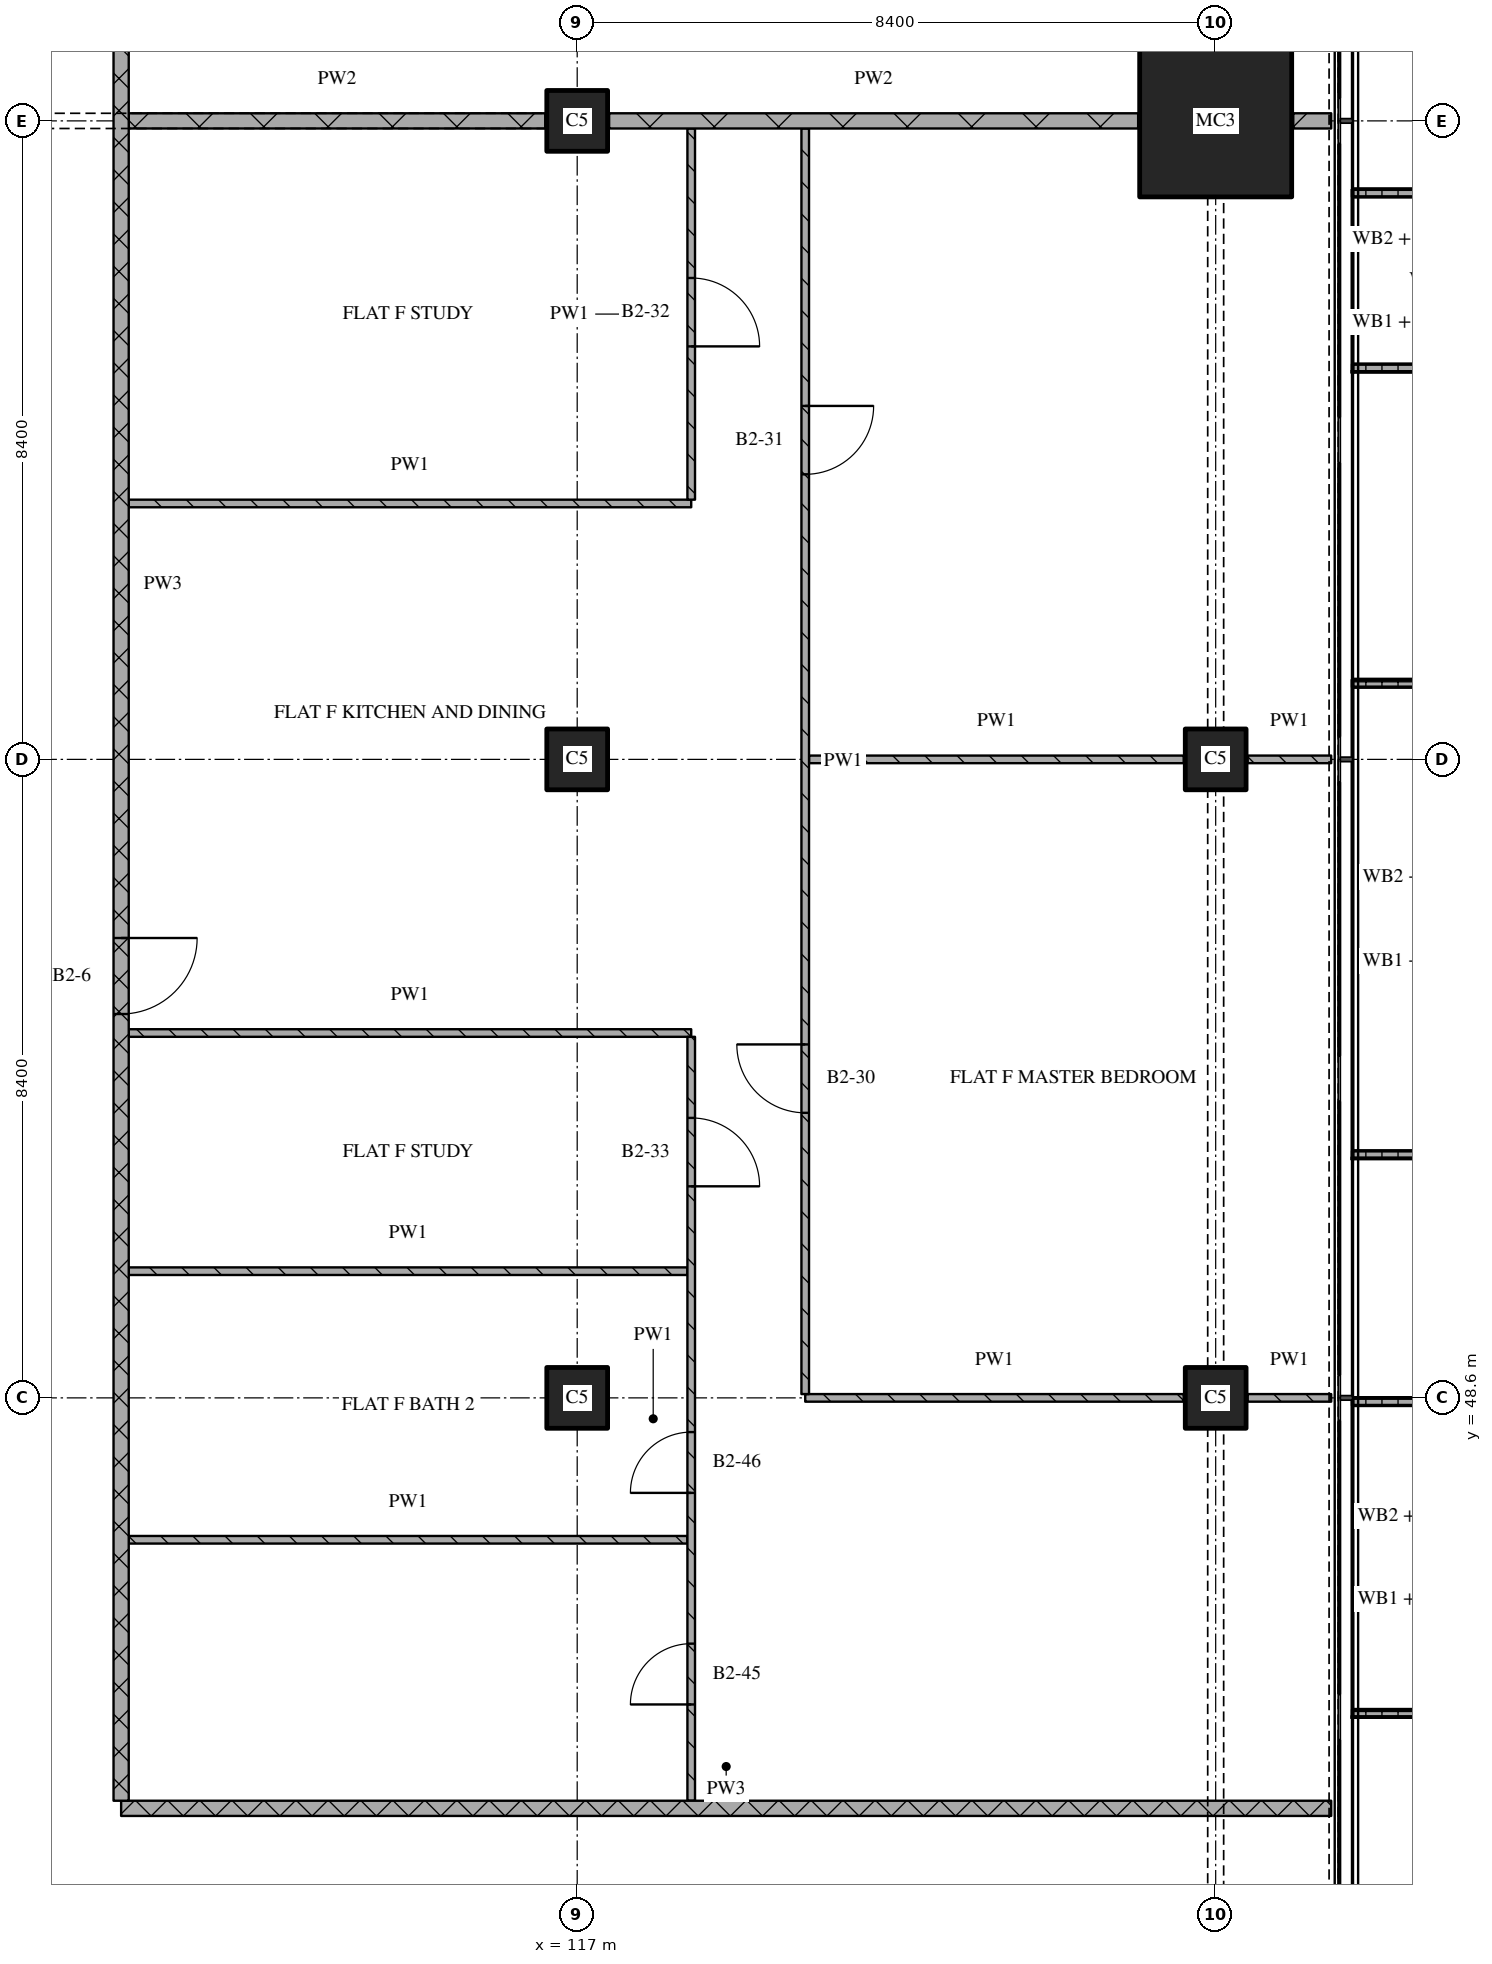
"""IFC4 building model, lengths in metres.
Left out: names, types, materials, properties, quantities, classifications, styles, units other than length and angle.
Written with IfcOpenShell. Run it as: python <this file> out.ifc"""

import sys

from ifc_helpers import new_model, si_unit, direction, frame, frame_2d, origin, origin_2d, place, context, subcontext, project, spatial, polyline, rectangle, outline, extrude, element, fill, save


model = new_model("IFC4")
c1 = context("Model", 3, precision=1e-05, world=origin(), true_north=direction((0.0, 1.0)))
c2 = subcontext(c1, "Body", "Model", "MODEL_VIEW")
j1 = project(units=[si_unit("LENGTHUNIT", "METRE"), si_unit("PLANEANGLEUNIT", "RADIAN")], contexts=[c1])
p1 = place(None, origin())
s1 = spatial("IfcSite", under=j1, at=p1, CompositionType="ELEMENT")
p2 = place(p1, origin())
s2 = spatial("IfcBuilding", under=s1, at=p2, CompositionType="ELEMENT")
p3 = place(p2, frame((0.0, 0.0, 106.05)))
s3 = spatial("IfcBuildingStorey", under=s2, at=p3, CompositionType="ELEMENT", Elevation=106.05)
for number, where, z_axis, x_axis in (
    (1, (117.0, 48.6, 0.0), (0.0, 0.0, 1.0), (1.0, 0.0, 0.0)),
    (2, (117.0, 57.0, 0.0), (0.0, 0.0, 1.0), (1.0, 0.0, 0.0)),
    (3, (117.0, 65.4, 0.0), (0.0, 0.0, 1.0), (1.0, 0.0, 0.0)),
    (4, (125.4, 48.6, 0.0), (0.0, 0.0, 1.0), (1.0, 0.0, 0.0)),
    (5, (125.4, 57.0, 0.0), (0.0, 0.0, 1.0), (1.0, 0.0, 0.0)),
):
    element("IfcColumn", number, at=place(p3, frame(where, z_axis=z_axis, x_axis=x_axis)), inside=s3, PredefinedType="COLUMN", context=c2, shape_type="SweptSolid", body=[
        extrude(rectangle(XDim=0.8, YDim=0.8, at=origin_2d()), origin(), (0.0, 0.0, 1.0), 3.6),
    ])
p4 = place(p3, frame((125.4, 65.4, 0.0), z_axis=(0.0, 0.0, 1.0), x_axis=(1.0, 0.0, 0.0)))
e6 = element("IfcColumn", 6, at=p4, inside=s3, PredefinedType="COLUMN", context=c2, shape_type="SweptSolid", body=[
    extrude(rectangle(XDim=2.0, YDim=2.0, at=origin_2d()), origin(), (0.0, 0.0, 1.0), 3.6),
])
p5 = place(p3, origin())
e7 = element("IfcWall", 7, at=p5, inside=s3, PredefinedType="SOLIDWALL", context=c2, shape_type="SweptSolid", body=[
    extrude(outline(polyline([(127.2, 44.4), (127.2, 44.5), (128.833, 44.5), (128.833, 48.5), (127.2, 48.5), (127.2, 48.6), (128.933, 48.6), (128.933, 44.4), (127.2, 44.4)])), origin(), (0.0, 0.0, 1.0), 1.0),
])
p6 = place(p3, origin())
e8 = element("IfcWall", 8, at=p6, inside=s3, PredefinedType="SOLIDWALL", context=c2, shape_type="SweptSolid", body=[
    extrude(outline(polyline([(127.2, 51.75), (127.2, 51.85), (128.967, 51.85), (128.967, 57.95), (127.2, 57.95), (127.2, 58.05), (129.067, 58.05), (129.067, 51.75), (127.2, 51.75)])), origin(), (0.0, 0.0, 1.0), 1.0),
])
p7 = place(p3, origin())
e9 = element("IfcWall", 9, at=p7, inside=s3, PredefinedType="SOLIDWALL", context=c2, shape_type="SweptSolid", body=[
    extrude(outline(polyline([(127.2, 62.1), (127.2, 62.2), (128.7, 62.2), (128.7, 64.4), (127.2, 64.4), (127.2, 64.5), (128.8, 64.5), (128.8, 62.1), (127.2, 62.1)])), origin(), (0.0, 0.0, 1.0), 1.0),
])
p8 = place(p3, frame((111.0, 43.2, 0.0), z_axis=(0.0, 0.0, 1.0), x_axis=(1.0, 0.0, 0.0)))
e10 = element("IfcWall", 10, at=p8, inside=s3, PredefinedType="PARTITIONING", context=c2, shape_type="SweptSolid", body=[
    extrude(rectangle(XDim=15.92, YDim=0.2, at=frame_2d((7.96, 0.0))), origin(), (0.0, 0.0, 1.0), 3.32),
])
p9 = place(p3, frame((111.1, 46.733, 0.0), z_axis=(0.0, 0.0, 1.0), x_axis=(1.0, 0.0, 0.0)))
e11 = element("IfcWall", 11, at=p9, inside=s3, PredefinedType="PARTITIONING", context=c2, shape_type="SweptSolid", body=[
    extrude(rectangle(XDim=7.35, YDim=0.1, at=frame_2d((3.675, 0.0))), origin(), (0.0, 0.0, 1.0), 3.32),
])
p10 = place(p3, frame((120.0, 48.6, 0.0), z_axis=(0.0, 0.0, 1.0), x_axis=(1.0, 0.0, 0.0)))
e12 = element("IfcWall", 12, at=p10, inside=s3, PredefinedType="PARTITIONING", context=c2, shape_type="SweptSolid", body=[
    extrude(rectangle(XDim=4.98, YDim=0.1, at=frame_2d((2.49, 0.0))), origin(), (0.0, 0.0, 1.0), 3.32),
])
p11 = place(p3, frame((125.82, 48.6, 0.0), z_axis=(0.0, 0.0, 1.0), x_axis=(1.0, 0.0, 0.0)))
e13 = element("IfcWall", 13, at=p11, inside=s3, PredefinedType="PARTITIONING", context=c2, shape_type="SweptSolid", body=[
    extrude(rectangle(XDim=1.1, YDim=0.1, at=frame_2d((0.55, 0.0))), origin(), (0.0, 0.0, 1.0), 3.32),
])
p12 = place(p3, frame((111.1, 50.267, 0.0), z_axis=(0.0, 0.0, 1.0), x_axis=(1.0, 0.0, 0.0)))
e14 = element("IfcWall", 14, at=p12, inside=s3, PredefinedType="PARTITIONING", context=c2, shape_type="SweptSolid", body=[
    extrude(rectangle(XDim=7.35, YDim=0.1, at=frame_2d((3.675, 0.0))), origin(), (0.0, 0.0, 1.0), 3.32),
])
p13 = place(p3, frame((111.1, 53.4, 0.0), z_axis=(0.0, 0.0, 1.0), x_axis=(1.0, 0.0, 0.0)))
e15 = element("IfcWall", 15, at=p13, inside=s3, PredefinedType="PARTITIONING", context=c2, shape_type="SweptSolid", body=[
    extrude(rectangle(XDim=7.4, YDim=0.1, at=frame_2d((3.7, 0.0))), origin(), (0.0, 0.0, 1.0), 3.32),
])
p14 = place(p3, frame((120.05, 57.0, 0.0), z_axis=(0.0, 0.0, 1.0), x_axis=(1.0, 0.0, 0.0)))
e16 = element("IfcWall", 16, at=p14, inside=s3, PredefinedType="PARTITIONING", context=c2, shape_type="SweptSolid", body=[
    extrude(rectangle(XDim=4.93, YDim=0.1, at=frame_2d((2.465, 0.0))), origin(), (0.0, 0.0, 1.0), 3.32),
])
p15 = place(p3, frame((125.82, 57.0, 0.0), z_axis=(0.0, 0.0, 1.0), x_axis=(1.0, 0.0, 0.0)))
e17 = element("IfcWall", 17, at=p15, inside=s3, PredefinedType="PARTITIONING", context=c2, shape_type="SweptSolid", body=[
    extrude(rectangle(XDim=1.1, YDim=0.1, at=frame_2d((0.55, 0.0))), origin(), (0.0, 0.0, 1.0), 3.32),
])
p16 = place(p3, frame((111.1, 60.367, 0.0), z_axis=(0.0, 0.0, 1.0), x_axis=(1.0, 0.0, 0.0)))
e18 = element("IfcWall", 18, at=p16, inside=s3, PredefinedType="PARTITIONING", context=c2, shape_type="SweptSolid", body=[
    extrude(rectangle(XDim=7.4, YDim=0.1, at=frame_2d((3.7, 0.0))), origin(), (0.0, 0.0, 1.0), 3.32),
])
p17 = place(p3, frame((111.1, 65.4, 0.0), z_axis=(0.0, 0.0, 1.0), x_axis=(1.0, 0.0, 0.0)))
e19 = element("IfcWall", 19, at=p17, inside=s3, PredefinedType="PARTITIONING", context=c2, shape_type="SweptSolid", body=[
    extrude(rectangle(XDim=5.48, YDim=0.2, at=frame_2d((2.74, 0.0))), origin(), (0.0, 0.0, 1.0), 2.82),
])
p18 = place(p3, frame((117.42, 65.4, 0.0), z_axis=(0.0, 0.0, 1.0), x_axis=(1.0, 0.0, 0.0)))
e20 = element("IfcWall", 20, at=p18, inside=s3, PredefinedType="PARTITIONING", context=c2, shape_type="SweptSolid", body=[
    extrude(rectangle(XDim=6.96, YDim=0.2, at=frame_2d((3.48, 0.0))), origin(), (0.0, 0.0, 1.0), 3.32),
])
p19 = place(p3, frame((126.42, 65.4, 0.0), z_axis=(0.0, 0.0, 1.0), x_axis=(1.0, 0.0, 0.0)))
e21 = element("IfcWall", 21, at=p19, inside=s3, PredefinedType="PARTITIONING", context=c2, shape_type="SweptSolid", body=[
    extrude(rectangle(XDim=0.5, YDim=0.2, at=frame_2d((0.25, 0.0))), origin(), (0.0, 0.0, 1.0), 3.32),
])
p20 = place(p3, frame((111.0, 75.32, 0.0), z_axis=(0.0, 0.0, 1.0), x_axis=(0.0, -1.0, 0.0)))
e22 = element("IfcWall", 22, at=p20, inside=s3, PredefinedType="PARTITIONING", context=c2, shape_type="SweptSolid", body=[
    extrude(rectangle(XDim=32.02, YDim=0.2, at=frame_2d((16.01, 0.0))), origin(), (0.0, 0.0, 1.0), 3.32),
])
p21 = place(p20, frame((3.87, 0.0, 0.0)))
e23 = element("IfcOpeningElement", 23, at=p21, cuts=e22, PredefinedType="OPENING", context=c2, shape_type="SweptSolid", body=[
    extrude(rectangle(XDim=1.0, YDim=2.1, at=frame_2d((0.5, 1.05))), frame((0.0, 0.11, 0.0), z_axis=(0.0, -1.0, 0.0), x_axis=(1.0, 0.0, 0.0)), (0.0, 0.0, 1.0), 0.22),
])
p22 = place(p20, frame((20.67, 0.0, 0.0)))
e24 = element("IfcOpeningElement", 24, at=p22, cuts=e22, PredefinedType="OPENING", context=c2, shape_type="SweptSolid", body=[
    extrude(rectangle(XDim=1.0, YDim=2.1, at=frame_2d((0.5, 1.05))), frame((0.0, 0.11, 0.0), z_axis=(0.0, -1.0, 0.0), x_axis=(1.0, 0.0, 0.0)), (0.0, 0.0, 1.0), 0.22),
])
p23 = place(p3, frame((118.5, 43.3, 0.0), z_axis=(0.0, 0.0, 1.0), x_axis=(0.0, 1.0, 0.0)))
e25 = element("IfcWall", 25, at=p23, inside=s3, PredefinedType="PARTITIONING", context=c2, shape_type="SweptSolid", body=[
    extrude(rectangle(XDim=10.05, YDim=0.1, at=frame_2d((5.025, 0.0))), origin(), (0.0, 0.0, 1.0), 3.32),
])
p24 = place(p23, frame((1.267, 0.0, 0.0)))
e26 = element("IfcOpeningElement", 26, at=p24, cuts=e25, PredefinedType="OPENING", context=c2, shape_type="SweptSolid", body=[
    extrude(rectangle(XDim=0.8, YDim=2.1, at=frame_2d((0.4, 1.05))), frame((0.0, 0.06, 0.0), z_axis=(0.0, -1.0, 0.0), x_axis=(1.0, 0.0, 0.0)), (0.0, 0.0, 1.0), 0.12),
])
p25 = place(p23, frame((4.05, 0.0, 0.0)))
e27 = element("IfcOpeningElement", 27, at=p25, cuts=e25, PredefinedType="OPENING", context=c2, shape_type="SweptSolid", body=[
    extrude(rectangle(XDim=0.8, YDim=2.1, at=frame_2d((0.4, 1.05))), frame((0.0, 0.06, 0.0), z_axis=(0.0, -1.0, 0.0), x_axis=(1.0, 0.0, 0.0)), (0.0, 0.0, 1.0), 0.12),
])
p26 = place(p23, frame((8.083, 0.0, 0.0)))
e28 = element("IfcOpeningElement", 28, at=p26, cuts=e25, PredefinedType="OPENING", context=c2, shape_type="SweptSolid", body=[
    extrude(rectangle(XDim=0.9, YDim=2.1, at=frame_2d((0.45, 1.05))), frame((0.0, 0.06, 0.0), z_axis=(0.0, -1.0, 0.0), x_axis=(1.0, 0.0, 0.0)), (0.0, 0.0, 1.0), 0.12),
])
p27 = place(p3, frame((118.5, 60.417, 0.0), z_axis=(0.0, 0.0, 1.0), x_axis=(0.0, 1.0, 0.0)))
e29 = element("IfcWall", 29, at=p27, inside=s3, PredefinedType="PARTITIONING", context=c2, shape_type="SweptSolid", body=[
    extrude(rectangle(XDim=4.883, YDim=0.1, at=frame_2d((2.442, 0.0))), origin(), (0.0, 0.0, 1.0), 3.32),
])
p28 = place(p27, frame((2.017, 0.0, 0.0)))
e30 = element("IfcOpeningElement", 30, at=p28, cuts=e29, PredefinedType="OPENING", context=c2, shape_type="SweptSolid", body=[
    extrude(rectangle(XDim=0.9, YDim=2.1, at=frame_2d((0.45, 1.05))), frame((0.0, 0.06, 0.0), z_axis=(0.0, -1.0, 0.0), x_axis=(1.0, 0.0, 0.0)), (0.0, 0.0, 1.0), 0.12),
])
p29 = place(p3, frame((120.0, 65.3, 0.0), z_axis=(0.0, 0.0, 1.0), x_axis=(0.0, -1.0, 0.0)))
e31 = element("IfcWall", 31, at=p29, inside=s3, PredefinedType="PARTITIONING", context=c2, shape_type="SweptSolid", body=[
    extrude(rectangle(XDim=16.65, YDim=0.1, at=frame_2d((8.325, 0.0))), origin(), (0.0, 0.0, 1.0), 3.32),
])
p30 = place(p29, frame((3.65, 0.0, 0.0)))
e32 = element("IfcOpeningElement", 32, at=p30, cuts=e31, PredefinedType="OPENING", context=c2, shape_type="SweptSolid", body=[
    extrude(rectangle(XDim=0.9, YDim=2.1, at=frame_2d((0.45, 1.05))), frame((0.0, 0.06, 0.0), z_axis=(0.0, -1.0, 0.0), x_axis=(1.0, 0.0, 0.0)), (0.0, 0.0, 1.0), 0.12),
])
p31 = place(p29, frame((12.05, 0.0, 0.0)))
e33 = element("IfcOpeningElement", 33, at=p31, cuts=e31, PredefinedType="OPENING", context=c2, shape_type="SweptSolid", body=[
    extrude(rectangle(XDim=0.9, YDim=2.1, at=frame_2d((0.45, 1.05))), frame((0.0, 0.06, 0.0), z_axis=(0.0, -1.0, 0.0), x_axis=(1.0, 0.0, 0.0)), (0.0, 0.0, 1.0), 0.12),
])
p32 = place(p22, origin())
e34 = element("IfcDoor", 34, at=p32, inside=s3, OperationType="SINGLE_SWING_LEFT", PredefinedType="DOOR", context=c2, shape_type="SweptSolid", body=[
    extrude(rectangle(XDim=1.0, YDim=2.1, at=frame_2d((0.5, 1.05))), frame((0.0, 0.025, 0.0), z_axis=(0.0, -1.0, 0.0), x_axis=(1.0, 0.0, 0.0)), (0.0, 0.0, 1.0), 0.05),
])
fill(e24, e34)
p33 = place(p24, origin())
e35 = element("IfcDoor", 35, at=p33, inside=s3, OperationType="SINGLE_SWING_LEFT", PredefinedType="DOOR", context=c2, shape_type="SweptSolid", body=[
    extrude(rectangle(XDim=0.8, YDim=2.1, at=frame_2d((0.4, 1.05))), frame((0.0, 0.025, 0.0), z_axis=(0.0, -1.0, 0.0), x_axis=(1.0, 0.0, 0.0)), (0.0, 0.0, 1.0), 0.05),
])
fill(e26, e35)
p34 = place(p25, origin())
e36 = element("IfcDoor", 36, at=p34, inside=s3, OperationType="SINGLE_SWING_LEFT", PredefinedType="DOOR", context=c2, shape_type="SweptSolid", body=[
    extrude(rectangle(XDim=0.8, YDim=2.1, at=frame_2d((0.4, 1.05))), frame((0.0, 0.025, 0.0), z_axis=(0.0, -1.0, 0.0), x_axis=(1.0, 0.0, 0.0)), (0.0, 0.0, 1.0), 0.05),
])
fill(e27, e36)
p35 = place(p26, origin())
e37 = element("IfcDoor", 37, at=p35, inside=s3, OperationType="SINGLE_SWING_RIGHT", PredefinedType="DOOR", context=c2, shape_type="SweptSolid", body=[
    extrude(rectangle(XDim=0.9, YDim=2.1, at=frame_2d((0.45, 1.05))), frame((0.0, 0.025, 0.0), z_axis=(0.0, -1.0, 0.0), x_axis=(1.0, 0.0, 0.0)), (0.0, 0.0, 1.0), 0.05),
])
fill(e28, e37)
p36 = place(p28, origin())
e38 = element("IfcDoor", 38, at=p36, inside=s3, OperationType="SINGLE_SWING_RIGHT", PredefinedType="DOOR", context=c2, shape_type="SweptSolid", body=[
    extrude(rectangle(XDim=0.9, YDim=2.1, at=frame_2d((0.45, 1.05))), frame((0.0, 0.025, 0.0), z_axis=(0.0, -1.0, 0.0), x_axis=(1.0, 0.0, 0.0)), (0.0, 0.0, 1.0), 0.05),
])
fill(e30, e38)
p37 = place(p30, origin())
e39 = element("IfcDoor", 39, at=p37, inside=s3, OperationType="SINGLE_SWING_LEFT", PredefinedType="DOOR", context=c2, shape_type="SweptSolid", body=[
    extrude(rectangle(XDim=0.9, YDim=2.1, at=frame_2d((0.45, 1.05))), frame((0.0, 0.025, 0.0), z_axis=(0.0, -1.0, 0.0), x_axis=(1.0, 0.0, 0.0)), (0.0, 0.0, 1.0), 0.05),
])
fill(e32, e39)
p38 = place(p31, origin())
e40 = element("IfcDoor", 40, at=p38, inside=s3, OperationType="SINGLE_SWING_RIGHT", PredefinedType="DOOR", context=c2, shape_type="SweptSolid", body=[
    extrude(rectangle(XDim=0.9, YDim=2.1, at=frame_2d((0.45, 1.05))), frame((0.0, 0.025, 0.0), z_axis=(0.0, -1.0, 0.0), x_axis=(1.0, 0.0, 0.0)), (0.0, 0.0, 1.0), 0.05),
])
fill(e33, e40)
save(model, sys.argv[1])
